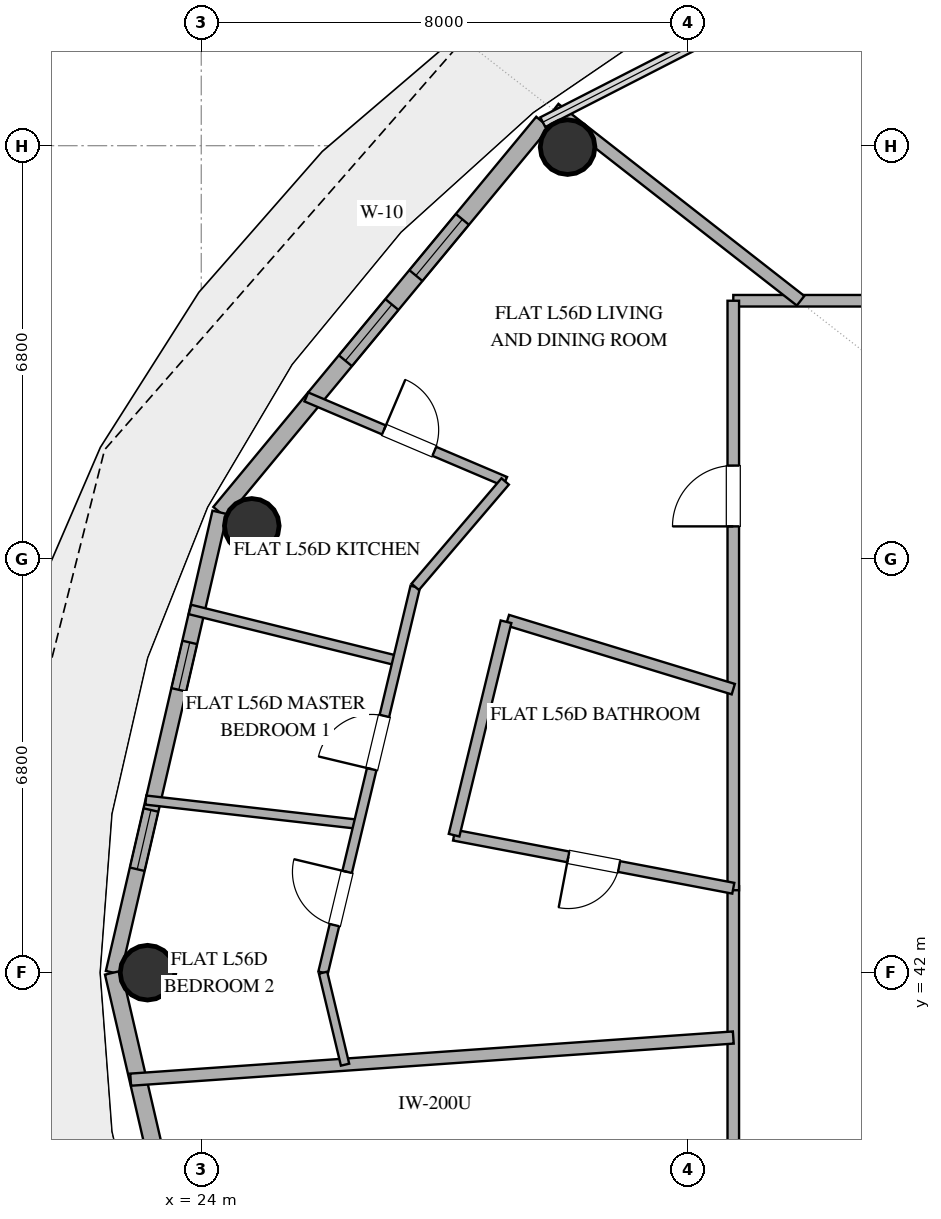
"""IFC4 building model, lengths in metres.
Left out: names, types, materials, properties, quantities, classifications, styles, units other than length and angle.
Written with IfcOpenShell. Run it as: python <this file> out.ifc"""

import sys

from ifc_helpers import new_model, si_unit, direction, frame, frame_2d, origin, origin_2d, place, context, subcontext, project, spatial, rectangle, hollow_circle, extrude, element, fill, save


model = new_model("IFC4")
c1 = context("Model", 3, precision=1e-05, world=origin(), true_north=direction((0.0, 1.0)))
c2 = subcontext(c1, "Body", "Model", "MODEL_VIEW")
j1 = project(units=[si_unit("LENGTHUNIT", "METRE"), si_unit("PLANEANGLEUNIT", "RADIAN")], contexts=[c1])
p1 = place(None, origin())
s1 = spatial("IfcSite", under=j1, at=p1, CompositionType="ELEMENT")
p2 = place(p1, origin())
s2 = spatial("IfcBuilding", under=s1, at=p2, CompositionType="ELEMENT")
p3 = place(p2, frame((0.0, 0.0, 220.8)))
s3 = spatial("IfcBuildingStorey", under=s2, at=p3, CompositionType="ELEMENT", Elevation=220.8)
for number, where, z_axis, x_axis in (
    (1, (30.025, 55.576, 0.0), (0.0, 0.0, 1.0), (1.0, 0.0, 0.0)),
    (2, (24.831, 49.347, 0.0), (0.0, 0.0, 1.0), (1.0, 0.0, 0.0)),
    (3, (23.117, 42.0, 0.0), (0.0, 0.0, 1.0), (1.0, 0.0, 0.0)),
):
    element("IfcColumn", number, at=place(p3, frame(where, z_axis=z_axis, x_axis=x_axis)), inside=s3, PredefinedType="COLUMN", context=c2, shape_type="SweptSolid", body=[
        extrude(hollow_circle(Radius=0.45, WallThickness=0.025, at=origin_2d()), origin(), (0.0, 0.0, 1.0), 3.36),
    ])
p4 = place(p3, frame((29.617, 55.987, 0.0), z_axis=(0.0, 0.0, 1.0), x_axis=(-0.63761509934, -0.770355103243, 0.0)))
e4 = element("IfcWall", 4, at=p4, inside=s3, PredefinedType="SOLIDWALL", context=c2, shape_type="SweptSolid", body=[
    extrude(rectangle(XDim=8.33, YDim=0.28, at=frame_2d((4.165, 0.0))), origin(), (0.0, 0.0, 1.0), 3.36),
])
p5 = place(p4, frame((2.074, 0.0, 0.85)))
e5 = element("IfcOpeningElement", 5, at=p5, cuts=e4, PredefinedType="OPENING", context=c2, shape_type="SweptSolid", body=[
    extrude(rectangle(XDim=1.2, YDim=1.6, at=frame_2d((0.6, 0.8))), frame((0.0, 0.15, 0.0), z_axis=(0.0, -1.0, 0.0), x_axis=(1.0, 0.0, 0.0)), (0.0, 0.0, 1.0), 0.3),
])
p6 = place(p4, frame((3.892, 0.0, 0.85)))
e6 = element("IfcOpeningElement", 6, at=p6, cuts=e4, PredefinedType="OPENING", context=c2, shape_type="SweptSolid", body=[
    extrude(rectangle(XDim=1.2, YDim=1.6, at=frame_2d((0.6, 0.8))), frame((0.0, 0.15, 0.0), z_axis=(0.0, -1.0, 0.0), x_axis=(1.0, 0.0, 0.0)), (0.0, 0.0, 1.0), 0.3),
])
p7 = place(p3, frame((24.306, 49.57, 0.0), z_axis=(0.0, 0.0, 1.0), x_axis=(-0.225635078214, -0.974211892495, 0.0)))
e7 = element("IfcWall", 7, at=p7, inside=s3, PredefinedType="SOLIDWALL", context=c2, shape_type="SweptSolid", body=[
    extrude(rectangle(XDim=7.77, YDim=0.25, at=frame_2d((3.885, 0.0))), origin(), (0.0, 0.0, 1.0), 3.36),
])
p8 = place(p7, frame((2.195, 0.0, 1.54)))
e8 = element("IfcOpeningElement", 8, at=p8, cuts=e7, PredefinedType="OPENING", context=c2, shape_type="SweptSolid", body=[
    extrude(rectangle(XDim=0.8, YDim=1.0, at=frame_2d((0.4, 0.5))), frame((0.0, 0.135, 0.0), z_axis=(0.0, -1.0, 0.0), x_axis=(1.0, 0.0, 0.0)), (0.0, 0.0, 1.0), 0.27),
])
p9 = place(p7, frame((5.024, 0.0, 0.35)))
e9 = element("IfcOpeningElement", 9, at=p9, cuts=e7, PredefinedType="OPENING", context=c2, shape_type="SweptSolid", body=[
    extrude(rectangle(XDim=1.0, YDim=1.05, at=frame_2d((0.5, 0.525))), frame((0.0, 0.135, 0.0), z_axis=(0.0, -1.0, 0.0), x_axis=(1.0, 0.0, 0.0)), (0.0, 0.0, 1.0), 0.27),
])
p10 = place(p3, frame((22.553, 42.0, 0.0), z_axis=(0.0, 0.0, 1.0), x_axis=(0.225635078214, -0.974211892495, 0.0)))
e10 = element("IfcWall", 10, at=p10, inside=s3, PredefinedType="SOLIDWALL", context=c2, shape_type="SweptSolid", body=[
    extrude(rectangle(XDim=7.77, YDim=0.28, at=frame_2d((3.885, 0.0))), origin(), (0.0, 0.0, 1.0), 3.36),
])
p11 = place(p10, frame((5.142, 0.0, 0.0)))
e11 = element("IfcOpeningElement", 11, at=p11, cuts=e10, PredefinedType="OPENING", context=c2, shape_type="SweptSolid", body=[
    extrude(rectangle(XDim=1.1, YDim=2.25, at=frame_2d((0.55, 1.125))), frame((0.0, 0.15, 0.0), z_axis=(0.0, -1.0, 0.0), x_axis=(1.0, 0.0, 0.0)), (0.0, 0.0, 1.0), 0.3),
])
p12 = place(p3, frame((32.75, 53.05, 0.0), z_axis=(0.0, 0.0, 1.0), x_axis=(1.0, 0.0, 0.0)))
e12 = element("IfcWall", 12, at=p12, inside=s3, PredefinedType="PARTITIONING", context=c2, shape_type="SweptSolid", body=[
    extrude(rectangle(XDim=16.055, YDim=0.19, at=frame_2d((8.027, 0.0))), origin(), (0.0, 0.0, 1.0), 2.72),
])
p13 = place(p12, frame((5.874, 0.0, 0.0)))
e13 = element("IfcOpeningElement", 13, at=p13, cuts=e12, PredefinedType="OPENING", context=c2, shape_type="SweptSolid", body=[
    extrude(rectangle(XDim=1.0, YDim=2.2, at=frame_2d((0.5, 1.1))), frame((0.0, 0.105, 0.0), z_axis=(0.0, -1.0, 0.0), x_axis=(1.0, 0.0, 0.0)), (0.0, 0.0, 1.0), 0.21),
])
p14 = place(p3, frame((32.75, 30.95, 0.0), z_axis=(0.0, 0.0, 1.0), x_axis=(0.0, 1.0, 0.0)))
e14 = element("IfcWall", 14, at=p14, inside=s3, PredefinedType="PARTITIONING", context=c2, shape_type="SweptSolid", body=[
    extrude(rectangle(XDim=12.471, YDim=0.19, at=frame_2d((6.236, 0.0))), origin(), (0.0, 0.0, 1.0), 2.72),
])
p15 = place(p14, frame((4.508, 0.0, 0.0)))
e15 = element("IfcOpeningElement", 15, at=p15, cuts=e14, PredefinedType="OPENING", context=c2, shape_type="SweptSolid", body=[
    extrude(rectangle(XDim=1.0, YDim=2.2, at=frame_2d((0.5, 1.1))), frame((0.0, 0.105, 0.0), z_axis=(0.0, -1.0, 0.0), x_axis=(1.0, 0.0, 0.0)), (0.0, 0.0, 1.0), 0.21),
])
p16 = place(p3, frame((32.75, 43.356, 0.0), z_axis=(0.0, 0.0, 1.0), x_axis=(0.0, 1.0, 0.0)))
e16 = element("IfcWall", 16, at=p16, inside=s3, PredefinedType="PARTITIONING", context=c2, shape_type="SweptSolid", body=[
    extrude(rectangle(XDim=9.694, YDim=0.19, at=frame_2d((4.847, 0.0))), origin(), (0.0, 0.0, 1.0), 2.72),
])
p17 = place(p16, frame((5.983, 0.0, 0.0)))
e17 = element("IfcOpeningElement", 17, at=p17, cuts=e16, PredefinedType="OPENING", context=c2, shape_type="SweptSolid", body=[
    extrude(rectangle(XDim=1.0, YDim=2.2, at=frame_2d((0.5, 1.1))), frame((0.0, 0.105, 0.0), z_axis=(0.0, -1.0, 0.0), x_axis=(1.0, 0.0, 0.0)), (0.0, 0.0, 1.0), 0.21),
])
p18 = place(p3, frame((32.75, 40.934, 0.0), z_axis=(0.0, 0.0, 1.0), x_axis=(-0.997563620801, -0.069762615023, 0.0)))
e18 = element("IfcWall", 18, at=p18, inside=s3, PredefinedType="PARTITIONING", context=c2, shape_type="SweptSolid", body=[
    extrude(rectangle(XDim=9.935, YDim=0.2, at=frame_2d((4.968, 0.0))), origin(), (0.0, 0.0, 1.0), 2.72),
])
p19 = place(p3, frame((29.813, 56.209, 0.0), z_axis=(0.0, 0.0, 1.0), x_axis=(0.788043849094, -0.615619112687, 0.0)))
e19 = element("IfcWall", 19, at=p19, inside=s3, PredefinedType="PARTITIONING", context=c2, shape_type="SweptSolid", body=[
    extrude(rectangle(XDim=5.131, YDim=0.2, at=frame_2d((2.566, 0.0))), origin(), (0.0, 0.0, 1.0), 2.72),
])
p20 = place(p3, frame((32.75, 43.389, 0.0), z_axis=(0.0, 0.0, 1.0), x_axis=(-0.982412093784, 0.186725675755, 0.0)))
e20 = element("IfcWall", 20, at=p20, inside=s3, PredefinedType="PLUMBINGWALL", context=c2, shape_type="SweptSolid", body=[
    extrude(rectangle(XDim=4.674, YDim=0.18, at=frame_2d((2.337, 0.0))), origin(), (0.0, 0.0, 1.0), 2.72),
])
p21 = place(p20, frame((1.912, 0.0, 0.0)))
e21 = element("IfcOpeningElement", 21, at=p21, cuts=e20, PredefinedType="OPENING", context=c2, shape_type="SweptSolid", body=[
    extrude(rectangle(XDim=0.85, YDim=2.1, at=frame_2d((0.425, 1.05))), frame((0.0, 0.1, 0.0), z_axis=(0.0, -1.0, 0.0), x_axis=(1.0, 0.0, 0.0)), (0.0, 0.0, 1.0), 0.2),
])
p22 = place(p3, frame((29.036, 47.798, 0.0), z_axis=(0.0, 0.0, 1.0), x_axis=(0.956306177074, -0.292367056437, 0.0)))
e22 = element("IfcWall", 22, at=p22, inside=s3, PredefinedType="PLUMBINGWALL", context=c2, shape_type="SweptSolid", body=[
    extrude(rectangle(XDim=3.884, YDim=0.18, at=frame_2d((1.942, 0.0))), origin(), (0.0, 0.0, 1.0), 2.72),
])
p23 = place(p3, frame((28.158, 44.261, 0.0), z_axis=(0.0, 0.0, 1.0), x_axis=(0.236567164095, 0.971615138248, 0.0)))
e23 = element("IfcWall", 23, at=p23, inside=s3, PredefinedType="PLUMBINGWALL", context=c2, shape_type="SweptSolid", body=[
    extrude(rectangle(XDim=3.612, YDim=0.18, at=frame_2d((1.806, 0.0))), origin(), (0.0, 0.0, 1.0), 2.72),
])
p24 = place(p3, frame((25.729, 51.468, 0.0), z_axis=(0.0, 0.0, 1.0), x_axis=(0.920292576495, -0.39123084445, 0.0)))
e24 = element("IfcWall", 24, at=p24, inside=s3, PredefinedType="PLUMBINGWALL", context=c2, shape_type="SweptSolid", body=[
    extrude(rectangle(XDim=3.553, YDim=0.16, at=frame_2d((1.777, 0.0))), origin(), (0.0, 0.0, 1.0), 2.72),
])
p25 = place(p24, frame((1.387, 0.0, 0.0)))
e25 = element("IfcOpeningElement", 25, at=p25, cuts=e24, PredefinedType="OPENING", context=c2, shape_type="SweptSolid", body=[
    extrude(rectangle(XDim=0.9, YDim=2.1, at=frame_2d((0.45, 1.05))), frame((0.0, 0.09, 0.0), z_axis=(0.0, -1.0, 0.0), x_axis=(1.0, 0.0, 0.0)), (0.0, 0.0, 1.0), 0.18),
])
p26 = place(p3, frame((23.088, 44.838, 0.0), z_axis=(0.0, 0.0, 1.0), x_axis=(0.99356860566, -0.113231735156, 0.0)))
e26 = element("IfcWall", 26, at=p26, inside=s3, PredefinedType="PARTITIONING", context=c2, shape_type="SweptSolid", body=[
    extrude(rectangle(XDim=3.521, YDim=0.15, at=frame_2d((1.76, 0.0))), origin(), (0.0, 0.0, 1.0), 2.72),
])
p27 = place(p3, frame((27.229, 47.13, 0.0), z_axis=(0.0, 0.0, 1.0), x_axis=(-0.970832476512, 0.239758842484, 0.0)))
e27 = element("IfcWall", 27, at=p27, inside=s3, PredefinedType="PLUMBINGWALL", context=c2, shape_type="SweptSolid", body=[
    extrude(rectangle(XDim=3.518, YDim=0.16, at=frame_2d((1.759, 0.0))), origin(), (0.0, 0.0, 1.0), 2.72),
])
p28 = place(p3, frame((26.004, 42.0, 0.0), z_axis=(0.0, 0.0, 1.0), x_axis=(0.232298462197, 0.972644551962, 0.0)))
e28 = element("IfcWall", 28, at=p28, inside=s3, PredefinedType="PLUMBINGWALL", context=c2, shape_type="SweptSolid", body=[
    extrude(rectangle(XDim=6.523, YDim=0.16, at=frame_2d((3.262, 0.0))), origin(), (0.0, 0.0, 1.0), 2.72),
])
p29 = place(p28, frame((3.441, 0.0, 0.0)))
e29 = element("IfcOpeningElement", 29, at=p29, cuts=e28, PredefinedType="OPENING", context=c2, shape_type="SweptSolid", body=[
    extrude(rectangle(XDim=0.9, YDim=2.1, at=frame_2d((0.45, 1.05))), frame((0.0, 0.09, 0.0), z_axis=(0.0, -1.0, 0.0), x_axis=(1.0, 0.0, 0.0)), (0.0, 0.0, 1.0), 0.18),
])
p30 = place(p28, frame((0.804, 0.0, 0.0)))
e30 = element("IfcOpeningElement", 30, at=p30, cuts=e28, PredefinedType="OPENING", context=c2, shape_type="SweptSolid", body=[
    extrude(rectangle(XDim=0.9, YDim=2.1, at=frame_2d((0.45, 1.05))), frame((0.0, 0.09, 0.0), z_axis=(0.0, -1.0, 0.0), x_axis=(1.0, 0.0, 0.0)), (0.0, 0.0, 1.0), 0.18),
])
p31 = place(p3, frame((28.999, 50.078, 0.0), z_axis=(0.0, 0.0, 1.0), x_axis=(-0.649254822002, -0.760570954025, 0.0)))
e31 = element("IfcWall", 31, at=p31, inside=s3, PredefinedType="PLUMBINGWALL", context=c2, shape_type="SweptSolid", body=[
    extrude(rectangle(XDim=2.279, YDim=0.16, at=frame_2d((1.139, 0.0))), origin(), (0.0, 0.0, 1.0), 2.72),
])
p32 = place(p3, frame((26.004, 42.0, 0.0), z_axis=(0.0, 0.0, 1.0), x_axis=(0.232292411737, -0.972645996984, 0.0)))
e32 = element("IfcWall", 32, at=p32, inside=s3, PredefinedType="PARTITIONING", context=c2, shape_type="SweptSolid", body=[
    extrude(rectangle(XDim=1.555, YDim=0.14, at=frame_2d((0.778, 0.0))), origin(), (0.0, 0.0, 1.0), 2.72),
])
p33 = place(p5, origin())
e33 = element("IfcWindow", 33, at=p33, inside=s3, PartitioningType="SINGLE_PANEL", PredefinedType="WINDOW", context=c2, shape_type="SweptSolid", body=[
    extrude(rectangle(XDim=1.2, YDim=1.6, at=frame_2d((0.6, 0.8))), frame((0.0, 0.03, 0.0), z_axis=(0.0, -1.0, 0.0), x_axis=(1.0, 0.0, 0.0)), (0.0, 0.0, 1.0), 0.06),
])
fill(e5, e33)
p34 = place(p6, origin())
e34 = element("IfcWindow", 34, at=p34, inside=s3, PartitioningType="SINGLE_PANEL", PredefinedType="WINDOW", context=c2, shape_type="SweptSolid", body=[
    extrude(rectangle(XDim=1.2, YDim=1.6, at=frame_2d((0.6, 0.8))), frame((0.0, 0.03, 0.0), z_axis=(0.0, -1.0, 0.0), x_axis=(1.0, 0.0, 0.0)), (0.0, 0.0, 1.0), 0.06),
])
fill(e6, e34)
p35 = place(p8, origin())
e35 = element("IfcWindow", 35, at=p35, inside=s3, PartitioningType="SINGLE_PANEL", PredefinedType="WINDOW", context=c2, shape_type="SweptSolid", body=[
    extrude(rectangle(XDim=0.8, YDim=1.0, at=frame_2d((0.4, 0.5))), frame((0.0, 0.03, 0.0), z_axis=(0.0, -1.0, 0.0), x_axis=(1.0, 0.0, 0.0)), (0.0, 0.0, 1.0), 0.06),
])
fill(e8, e35)
p36 = place(p9, origin())
e36 = element("IfcWindow", 36, at=p36, inside=s3, PartitioningType="SINGLE_PANEL", PredefinedType="WINDOW", context=c2, shape_type="SweptSolid", body=[
    extrude(rectangle(XDim=1.0, YDim=1.05, at=frame_2d((0.5, 0.525))), frame((0.0, 0.03, 0.0), z_axis=(0.0, -1.0, 0.0), x_axis=(1.0, 0.0, 0.0)), (0.0, 0.0, 1.0), 0.06),
])
fill(e9, e36)
p37 = place(p17, origin())
e37 = element("IfcDoor", 37, at=p37, inside=s3, OperationType="SINGLE_SWING_LEFT", PredefinedType="DOOR", context=c2, shape_type="SweptSolid", body=[
    extrude(rectangle(XDim=1.0, YDim=2.2, at=frame_2d((0.5, 1.1))), frame((0.0, 0.025, 0.0), z_axis=(0.0, -1.0, 0.0), x_axis=(1.0, 0.0, 0.0)), (0.0, 0.0, 1.0), 0.05),
])
fill(e17, e37)
p38 = place(p21, origin())
e38 = element("IfcDoor", 38, at=p38, inside=s3, OperationType="SINGLE_SWING_RIGHT", PredefinedType="DOOR", context=c2, shape_type="SweptSolid", body=[
    extrude(rectangle(XDim=0.85, YDim=2.1, at=frame_2d((0.425, 1.05))), frame((0.0, 0.025, 0.0), z_axis=(0.0, -1.0, 0.0), x_axis=(1.0, 0.0, 0.0)), (0.0, 0.0, 1.0), 0.05),
])
fill(e21, e38)
p39 = place(p25, origin())
e39 = element("IfcDoor", 39, at=p39, inside=s3, OperationType="SINGLE_SWING_LEFT", PredefinedType="DOOR", context=c2, shape_type="SweptSolid", body=[
    extrude(rectangle(XDim=0.9, YDim=2.1, at=frame_2d((0.45, 1.05))), frame((0.0, 0.025, 0.0), z_axis=(0.0, -1.0, 0.0), x_axis=(1.0, 0.0, 0.0)), (0.0, 0.0, 1.0), 0.05),
])
fill(e25, e39)
p40 = place(p29, origin())
e40 = element("IfcDoor", 40, at=p40, inside=s3, OperationType="SINGLE_SWING_LEFT", PredefinedType="DOOR", context=c2, shape_type="SweptSolid", body=[
    extrude(rectangle(XDim=0.9, YDim=2.1, at=frame_2d((0.45, 1.05))), frame((0.0, 0.025, 0.0), z_axis=(0.0, -1.0, 0.0), x_axis=(1.0, 0.0, 0.0)), (0.0, 0.0, 1.0), 0.05),
])
fill(e29, e40)
p41 = place(p30, origin())
e41 = element("IfcDoor", 41, at=p41, inside=s3, OperationType="SINGLE_SWING_RIGHT", PredefinedType="DOOR", context=c2, shape_type="SweptSolid", body=[
    extrude(rectangle(XDim=0.9, YDim=2.1, at=frame_2d((0.45, 1.05))), frame((0.0, 0.025, 0.0), z_axis=(0.0, -1.0, 0.0), x_axis=(1.0, 0.0, 0.0)), (0.0, 0.0, 1.0), 0.05),
])
fill(e30, e41)
save(model, sys.argv[1])
